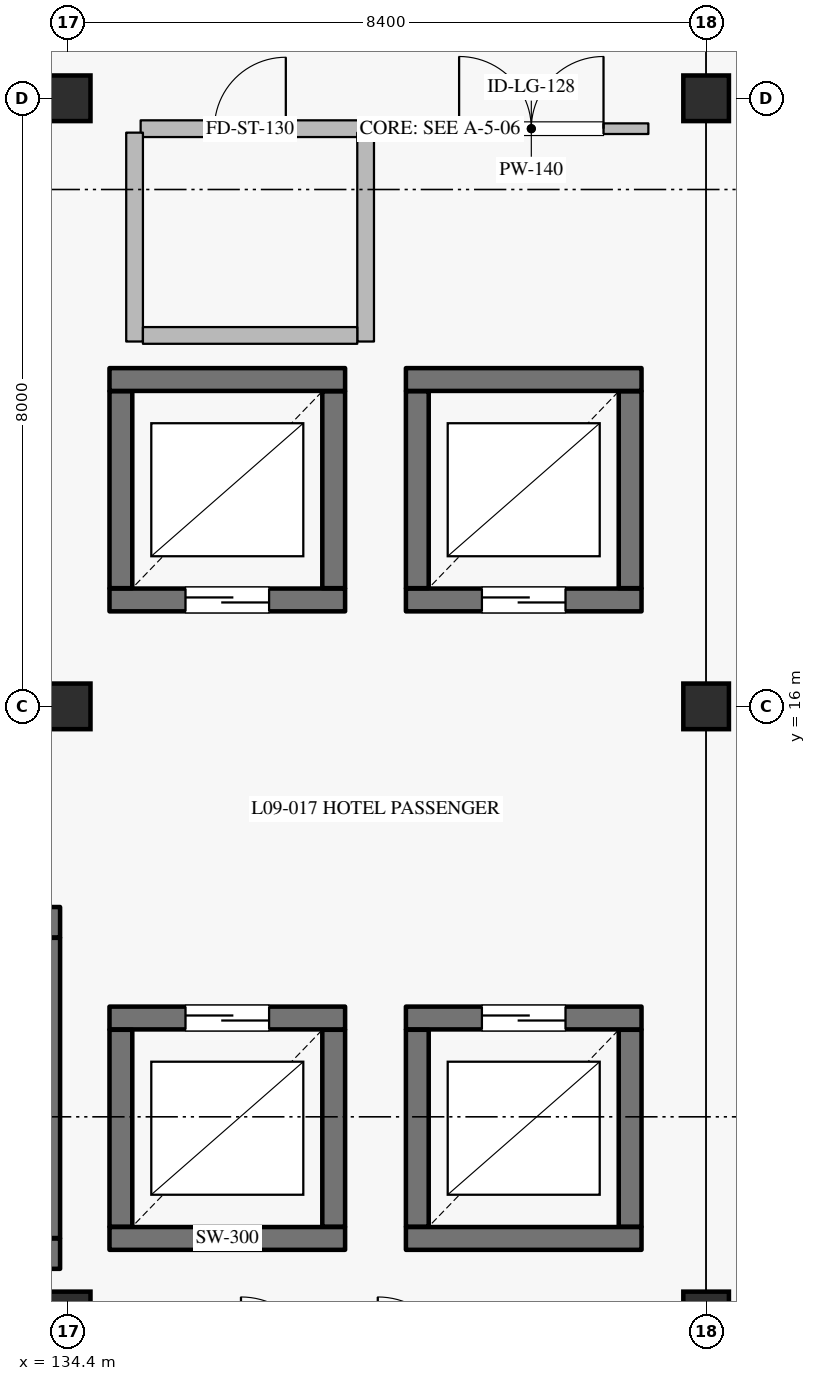
"""IFC4 building model, lengths in metres.
Left out: names, types, materials, properties, quantities, classifications, styles, units other than length and angle.
Written with IfcOpenShell. Run it as: python <this file> out.ifc"""

import sys

from ifc_helpers import new_model, si_unit, direction, frame, frame_2d, origin, origin_2d, place, context, subcontext, project, spatial, rectangle, extrude, element, fill, save


model = new_model("IFC4")
c1 = context("Model", 3, precision=1e-05, world=origin(), true_north=direction((0.0, 1.0)))
c2 = subcontext(c1, "Body", "Model", "MODEL_VIEW")
j1 = project(units=[si_unit("LENGTHUNIT", "METRE"), si_unit("PLANEANGLEUNIT", "RADIAN")], contexts=[c1])
p1 = place(None, origin())
s1 = spatial("IfcSite", under=j1, at=p1, CompositionType="ELEMENT")
p2 = place(p1, origin())
s2 = spatial("IfcBuilding", under=s1, at=p2, CompositionType="ELEMENT")
p3 = place(p2, frame((0.0, 0.0, 39.6)))
s3 = spatial("IfcBuildingStorey", under=s2, at=p3, CompositionType="ELEMENT", Elevation=39.6)
for number, where, z_axis, x_axis in (
    (1, (134.4, 16.0, 0.0), (0.0, 0.0, 1.0), (1.0, 0.0, 0.0)),
    (2, (142.8, 16.0, 0.0), (0.0, 0.0, 1.0), (1.0, 0.0, 0.0)),
    (3, (134.4, 8.0, 0.0), (0.0, 0.0, 1.0), (1.0, 0.0, 0.0)),
    (4, (134.4, 24.0, 0.0), (0.0, 0.0, 1.0), (1.0, 0.0, 0.0)),
    (5, (142.8, 8.0, 0.0), (0.0, 0.0, 1.0), (1.0, 0.0, 0.0)),
    (6, (142.8, 24.0, 0.0), (0.0, 0.0, 1.0), (1.0, 0.0, 0.0)),
):
    element("IfcColumn", number, at=place(p3, frame(where, z_axis=z_axis, x_axis=x_axis)), inside=s3, PredefinedType="COLUMN", context=c2, shape_type="SweptSolid", body=[
        extrude(rectangle(XDim=0.6, YDim=0.6, at=origin_2d()), origin(), (0.0, 0.0, 1.0), 3.6),
    ])
p4 = place(p3, frame((134.95, 17.4, 0.0), z_axis=(0.0, 0.0, 1.0), x_axis=(1.0, 0.0, 0.0)))
e7 = element("IfcWall", 7, at=p4, inside=s3, PredefinedType="SHEAR", context=c2, shape_type="SweptSolid", body=[
    extrude(rectangle(XDim=3.1, YDim=0.3, at=frame_2d((1.55, 0.0))), origin(), (0.0, 0.0, 1.0), 3.335),
])
p5 = place(p4, frame((1.0, 0.0, 0.0)))
e8 = element("IfcOpeningElement", 8, at=p5, cuts=e7, PredefinedType="OPENING", context=c2, shape_type="SweptSolid", body=[
    extrude(rectangle(XDim=1.1, YDim=2.2, at=frame_2d((0.55, 1.1))), frame((0.0, 0.16, 0.0), z_axis=(0.0, -1.0, 0.0), x_axis=(1.0, 0.0, 0.0)), (0.0, 0.0, 1.0), 0.32),
])
p6 = place(p3, frame((137.9, 17.555, 0.0), z_axis=(0.0, 0.0, 1.0), x_axis=(0.0, 1.0, 0.0)))
e9 = element("IfcWall", 9, at=p6, inside=s3, PredefinedType="SHEAR", context=c2, shape_type="SweptSolid", body=[
    extrude(rectangle(XDim=2.59, YDim=0.3, at=frame_2d((1.295, 0.0))), origin(), (0.0, 0.0, 1.0), 3.335),
])
p7 = place(p3, frame((138.05, 20.3, 0.0), z_axis=(0.0, 0.0, 1.0), x_axis=(-1.0, 0.0, 0.0)))
e10 = element("IfcWall", 10, at=p7, inside=s3, PredefinedType="SHEAR", context=c2, shape_type="SweptSolid", body=[
    extrude(rectangle(XDim=3.1, YDim=0.3, at=frame_2d((1.55, 0.0))), origin(), (0.0, 0.0, 1.0), 3.335),
])
p8 = place(p3, frame((135.1, 20.145, 0.0), z_axis=(0.0, 0.0, 1.0), x_axis=(0.0, -1.0, 0.0)))
e11 = element("IfcWall", 11, at=p8, inside=s3, PredefinedType="SHEAR", context=c2, shape_type="SweptSolid", body=[
    extrude(rectangle(XDim=2.59, YDim=0.3, at=frame_2d((1.295, 0.0))), origin(), (0.0, 0.0, 1.0), 3.335),
])
p9 = place(p3, frame((138.85, 17.4, 0.0), z_axis=(0.0, 0.0, 1.0), x_axis=(1.0, 0.0, 0.0)))
e12 = element("IfcWall", 12, at=p9, inside=s3, PredefinedType="SHEAR", context=c2, shape_type="SweptSolid", body=[
    extrude(rectangle(XDim=3.1, YDim=0.3, at=frame_2d((1.55, 0.0))), origin(), (0.0, 0.0, 1.0), 3.335),
])
p10 = place(p9, frame((1.0, 0.0, 0.0)))
e13 = element("IfcOpeningElement", 13, at=p10, cuts=e12, PredefinedType="OPENING", context=c2, shape_type="SweptSolid", body=[
    extrude(rectangle(XDim=1.1, YDim=2.2, at=frame_2d((0.55, 1.1))), frame((0.0, 0.16, 0.0), z_axis=(0.0, -1.0, 0.0), x_axis=(1.0, 0.0, 0.0)), (0.0, 0.0, 1.0), 0.32),
])
p11 = place(p3, frame((141.8, 17.555, 0.0), z_axis=(0.0, 0.0, 1.0), x_axis=(0.0, 1.0, 0.0)))
e14 = element("IfcWall", 14, at=p11, inside=s3, PredefinedType="SHEAR", context=c2, shape_type="SweptSolid", body=[
    extrude(rectangle(XDim=2.59, YDim=0.3, at=frame_2d((1.295, 0.0))), origin(), (0.0, 0.0, 1.0), 3.335),
])
p12 = place(p3, frame((141.95, 20.3, 0.0), z_axis=(0.0, 0.0, 1.0), x_axis=(-1.0, 0.0, 0.0)))
e15 = element("IfcWall", 15, at=p12, inside=s3, PredefinedType="SHEAR", context=c2, shape_type="SweptSolid", body=[
    extrude(rectangle(XDim=3.1, YDim=0.3, at=frame_2d((1.55, 0.0))), origin(), (0.0, 0.0, 1.0), 3.335),
])
p13 = place(p3, frame((139.0, 20.145, 0.0), z_axis=(0.0, 0.0, 1.0), x_axis=(0.0, -1.0, 0.0)))
e16 = element("IfcWall", 16, at=p13, inside=s3, PredefinedType="SHEAR", context=c2, shape_type="SweptSolid", body=[
    extrude(rectangle(XDim=2.59, YDim=0.3, at=frame_2d((1.295, 0.0))), origin(), (0.0, 0.0, 1.0), 3.335),
])
p14 = place(p3, frame((134.95, 9.0, 0.0), z_axis=(0.0, 0.0, 1.0), x_axis=(1.0, 0.0, 0.0)))
e17 = element("IfcWall", 17, at=p14, inside=s3, PredefinedType="SHEAR", context=c2, shape_type="SweptSolid", body=[
    extrude(rectangle(XDim=3.1, YDim=0.3, at=frame_2d((1.55, 0.0))), origin(), (0.0, 0.0, 1.0), 3.335),
])
p15 = place(p3, frame((137.9, 9.155, 0.0), z_axis=(0.0, 0.0, 1.0), x_axis=(0.0, 1.0, 0.0)))
e18 = element("IfcWall", 18, at=p15, inside=s3, PredefinedType="SHEAR", context=c2, shape_type="SweptSolid", body=[
    extrude(rectangle(XDim=2.59, YDim=0.3, at=frame_2d((1.295, 0.0))), origin(), (0.0, 0.0, 1.0), 3.335),
])
p16 = place(p3, frame((138.05, 11.9, 0.0), z_axis=(0.0, 0.0, 1.0), x_axis=(-1.0, 0.0, 0.0)))
e19 = element("IfcWall", 19, at=p16, inside=s3, PredefinedType="SHEAR", context=c2, shape_type="SweptSolid", body=[
    extrude(rectangle(XDim=3.1, YDim=0.3, at=frame_2d((1.55, 0.0))), origin(), (0.0, 0.0, 1.0), 3.335),
])
p17 = place(p16, frame((1.0, 0.0, 0.0)))
e20 = element("IfcOpeningElement", 20, at=p17, cuts=e19, PredefinedType="OPENING", context=c2, shape_type="SweptSolid", body=[
    extrude(rectangle(XDim=1.1, YDim=2.2, at=frame_2d((0.55, 1.1))), frame((0.0, 0.16, 0.0), z_axis=(0.0, -1.0, 0.0), x_axis=(1.0, 0.0, 0.0)), (0.0, 0.0, 1.0), 0.32),
])
p18 = place(p3, frame((135.1, 11.745, 0.0), z_axis=(0.0, 0.0, 1.0), x_axis=(0.0, -1.0, 0.0)))
e21 = element("IfcWall", 21, at=p18, inside=s3, PredefinedType="SHEAR", context=c2, shape_type="SweptSolid", body=[
    extrude(rectangle(XDim=2.59, YDim=0.3, at=frame_2d((1.295, 0.0))), origin(), (0.0, 0.0, 1.0), 3.335),
])
p19 = place(p3, frame((138.85, 9.0, 0.0), z_axis=(0.0, 0.0, 1.0), x_axis=(1.0, 0.0, 0.0)))
e22 = element("IfcWall", 22, at=p19, inside=s3, PredefinedType="SHEAR", context=c2, shape_type="SweptSolid", body=[
    extrude(rectangle(XDim=3.1, YDim=0.3, at=frame_2d((1.55, 0.0))), origin(), (0.0, 0.0, 1.0), 3.335),
])
p20 = place(p3, frame((141.8, 9.155, 0.0), z_axis=(0.0, 0.0, 1.0), x_axis=(0.0, 1.0, 0.0)))
e23 = element("IfcWall", 23, at=p20, inside=s3, PredefinedType="SHEAR", context=c2, shape_type="SweptSolid", body=[
    extrude(rectangle(XDim=2.59, YDim=0.3, at=frame_2d((1.295, 0.0))), origin(), (0.0, 0.0, 1.0), 3.335),
])
p21 = place(p3, frame((141.95, 11.9, 0.0), z_axis=(0.0, 0.0, 1.0), x_axis=(-1.0, 0.0, 0.0)))
e24 = element("IfcWall", 24, at=p21, inside=s3, PredefinedType="SHEAR", context=c2, shape_type="SweptSolid", body=[
    extrude(rectangle(XDim=3.1, YDim=0.3, at=frame_2d((1.55, 0.0))), origin(), (0.0, 0.0, 1.0), 3.335),
])
p22 = place(p21, frame((1.0, 0.0, 0.0)))
e25 = element("IfcOpeningElement", 25, at=p22, cuts=e24, PredefinedType="OPENING", context=c2, shape_type="SweptSolid", body=[
    extrude(rectangle(XDim=1.1, YDim=2.2, at=frame_2d((0.55, 1.1))), frame((0.0, 0.16, 0.0), z_axis=(0.0, -1.0, 0.0), x_axis=(1.0, 0.0, 0.0)), (0.0, 0.0, 1.0), 0.32),
])
p23 = place(p3, frame((139.0, 11.745, 0.0), z_axis=(0.0, 0.0, 1.0), x_axis=(0.0, -1.0, 0.0)))
e26 = element("IfcWall", 26, at=p23, inside=s3, PredefinedType="SHEAR", context=c2, shape_type="SweptSolid", body=[
    extrude(rectangle(XDim=2.59, YDim=0.3, at=frame_2d((1.295, 0.0))), origin(), (0.0, 0.0, 1.0), 3.335),
])
p24 = place(p3, frame((126.1, 8.8, 0.0), z_axis=(0.0, 0.0, 1.0), x_axis=(1.0, 0.0, 0.0)))
e27 = element("IfcWall", 27, at=p24, inside=s3, PredefinedType="SHEAR", context=c2, shape_type="SweptSolid", body=[
    extrude(rectangle(XDim=8.2, YDim=0.4, at=frame_2d((4.1, 0.0))), origin(), (0.0, 0.0, 1.0), 3.335),
])
p25 = place(p3, frame((134.1, 9.005, 0.0), z_axis=(0.0, 0.0, 1.0), x_axis=(0.0, 1.0, 0.0)))
e28 = element("IfcWall", 28, at=p25, inside=s3, PredefinedType="SHEAR", context=c2, shape_type="SweptSolid", body=[
    extrude(rectangle(XDim=3.95, YDim=0.4, at=frame_2d((1.975, 0.0))), origin(), (0.0, 0.0, 1.0), 3.335),
])
p26 = place(p3, frame((126.1, 13.16, 0.0), z_axis=(0.0, 0.0, 1.0), x_axis=(1.0, 0.0, 0.0)))
e29 = element("IfcWall", 29, at=p26, inside=s3, PredefinedType="SHEAR", context=c2, shape_type="SweptSolid", body=[
    extrude(rectangle(XDim=8.2, YDim=0.4, at=frame_2d((4.1, 0.0))), origin(), (0.0, 0.0, 1.0), 3.335),
])
p27 = place(p26, frame((0.43, 0.0, 0.0)))
e30 = element("IfcOpeningElement", 30, at=p27, cuts=e29, PredefinedType="OPENING", context=c2, shape_type="SweptSolid", body=[
    extrude(rectangle(XDim=1.16, YDim=2.2, at=frame_2d((0.58, 1.1))), frame((0.0, 0.21, 0.0), z_axis=(0.0, -1.0, 0.0), x_axis=(1.0, 0.0, 0.0)), (0.0, 0.0, 1.0), 0.42),
])
p28 = place(p3, frame((138.96, 23.6, 0.0), z_axis=(0.0, 0.0, 1.0), x_axis=(1.0, 0.0, 0.0)))
e31 = element("IfcWall", 31, at=p28, inside=s3, PredefinedType="PARTITIONING", context=c2, shape_type="SweptSolid", body=[
    extrude(rectangle(XDim=3.08, YDim=0.14, at=frame_2d((1.54, 0.0))), origin(), (0.0, 0.0, 1.0), 3.335),
])
p29 = place(p28, frame((0.59, 0.0, 0.0)))
e32 = element("IfcOpeningElement", 32, at=p29, cuts=e31, PredefinedType="OPENING", context=c2, shape_type="SweptSolid", body=[
    extrude(rectangle(XDim=1.9, YDim=2.4, at=frame_2d((0.95, 1.2))), frame((0.0, 0.08, 0.0), z_axis=(0.0, -1.0, 0.0), x_axis=(1.0, 0.0, 0.0)), (0.0, 0.0, 1.0), 0.16),
])
p30 = place(p3, frame((135.36, 23.6, 0.0), z_axis=(0.0, 0.0, 1.0), x_axis=(1.0, 0.0, 0.0)))
e33 = element("IfcWall", 33, at=p30, inside=s3, PredefinedType="PARTITIONING", context=c2, shape_type="SweptSolid", body=[
    extrude(rectangle(XDim=2.88, YDim=0.22, at=frame_2d((1.44, 0.0))), origin(), (0.0, 0.0, 1.0), 3.335),
])
p31 = place(p30, frame((0.97, 0.0, 0.0)))
e34 = element("IfcOpeningElement", 34, at=p31, cuts=e33, PredefinedType="OPENING", context=c2, shape_type="SweptSolid", body=[
    extrude(rectangle(XDim=0.94, YDim=2.15, at=frame_2d((0.47, 1.075))), frame((0.0, 0.12, 0.0), z_axis=(0.0, -1.0, 0.0), x_axis=(1.0, 0.0, 0.0)), (0.0, 0.0, 1.0), 0.24),
])
for number, where, z_axis, x_axis in (
    (35, (135.28, 20.8, 0.0), (0.0, 0.0, 1.0), (0.0, 1.0, 0.0)),
    (36, (138.32, 20.8, 0.0), (0.0, 0.0, 1.0), (0.0, 1.0, 0.0)),
):
    element("IfcWall", number, at=place(p3, frame(where, z_axis=z_axis, x_axis=x_axis)), inside=s3, PredefinedType="PARTITIONING", context=c2, shape_type="SweptSolid", body=[
        extrude(rectangle(XDim=2.748, YDim=0.22, at=frame_2d((1.374, 0.0))), origin(), (0.0, 0.0, 1.0), 3.335),
    ])
p32 = place(p3, frame((135.39, 20.88, 0.0), z_axis=(0.0, 0.0, 1.0), x_axis=(1.0, 0.0, 0.0)))
e37 = element("IfcWall", 37, at=p32, inside=s3, PredefinedType="PARTITIONING", context=c2, shape_type="SweptSolid", body=[
    extrude(rectangle(XDim=2.82, YDim=0.22, at=frame_2d((1.41, 0.0))), origin(), (0.0, 0.0, 1.0), 3.335),
])
p33 = place(p5, origin())
e38 = element("IfcDoor", 38, at=p33, inside=s3, OperationType="DOUBLE_DOOR_SLIDING", PredefinedType="DOOR", context=c2, shape_type="SweptSolid", body=[
    extrude(rectangle(XDim=1.1, YDim=2.2, at=frame_2d((0.55, 1.1))), frame((0.0, 0.025, 0.0), z_axis=(0.0, -1.0, 0.0), x_axis=(1.0, 0.0, 0.0)), (0.0, 0.0, 1.0), 0.05),
])
fill(e8, e38)
p34 = place(p10, origin())
e39 = element("IfcDoor", 39, at=p34, inside=s3, OperationType="DOUBLE_DOOR_SLIDING", PredefinedType="DOOR", context=c2, shape_type="SweptSolid", body=[
    extrude(rectangle(XDim=1.1, YDim=2.2, at=frame_2d((0.55, 1.1))), frame((0.0, 0.025, 0.0), z_axis=(0.0, -1.0, 0.0), x_axis=(1.0, 0.0, 0.0)), (0.0, 0.0, 1.0), 0.05),
])
fill(e13, e39)
p35 = place(p17, origin())
e40 = element("IfcDoor", 40, at=p35, inside=s3, OperationType="DOUBLE_DOOR_SLIDING", PredefinedType="DOOR", context=c2, shape_type="SweptSolid", body=[
    extrude(rectangle(XDim=1.1, YDim=2.2, at=frame_2d((0.55, 1.1))), frame((0.0, 0.025, 0.0), z_axis=(0.0, -1.0, 0.0), x_axis=(1.0, 0.0, 0.0)), (0.0, 0.0, 1.0), 0.05),
])
fill(e20, e40)
p36 = place(p22, origin())
e41 = element("IfcDoor", 41, at=p36, inside=s3, OperationType="DOUBLE_DOOR_SLIDING", PredefinedType="DOOR", context=c2, shape_type="SweptSolid", body=[
    extrude(rectangle(XDim=1.1, YDim=2.2, at=frame_2d((0.55, 1.1))), frame((0.0, 0.025, 0.0), z_axis=(0.0, -1.0, 0.0), x_axis=(1.0, 0.0, 0.0)), (0.0, 0.0, 1.0), 0.05),
])
fill(e25, e41)
p37 = place(p29, origin())
e42 = element("IfcDoor", 42, at=p37, inside=s3, OperationType="DOUBLE_DOOR_SINGLE_SWING", PredefinedType="DOOR", context=c2, shape_type="SweptSolid", body=[
    extrude(rectangle(XDim=1.9, YDim=2.4, at=frame_2d((0.95, 1.2))), frame((0.0, 0.025, 0.0), z_axis=(0.0, -1.0, 0.0), x_axis=(1.0, 0.0, 0.0)), (0.0, 0.0, 1.0), 0.05),
])
fill(e32, e42)
p38 = place(p31, origin())
e43 = element("IfcDoor", 43, at=p38, inside=s3, OperationType="SINGLE_SWING_RIGHT", PredefinedType="DOOR", context=c2, shape_type="SweptSolid", body=[
    extrude(rectangle(XDim=0.94, YDim=2.15, at=frame_2d((0.47, 1.075))), frame((0.0, 0.025, 0.0), z_axis=(0.0, -1.0, 0.0), x_axis=(1.0, 0.0, 0.0)), (0.0, 0.0, 1.0), 0.05),
])
fill(e34, e43)
save(model, sys.argv[1])
